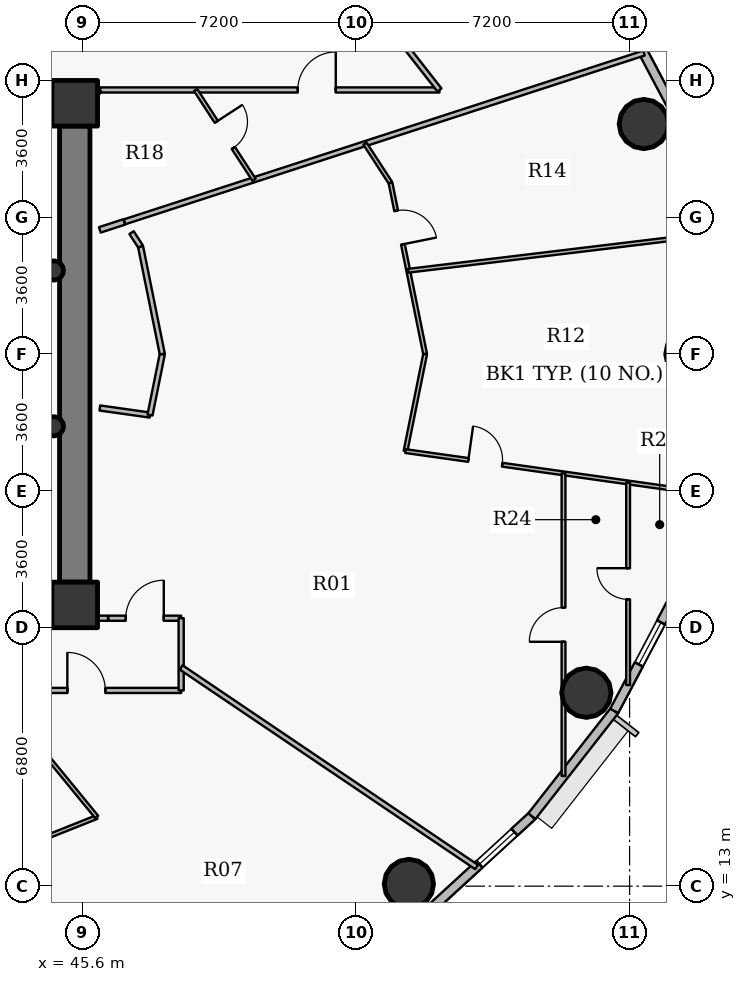
"""IFC4 building model, lengths in metres.
Left out: names, types, materials, properties, quantities, classifications, styles, units other than length and angle.
Written with IfcOpenShell. Run it as: python <this file> out.ifc"""

import sys

from ifc_helpers import new_model, si_unit, direction, frame, frame_2d, origin, origin_2d, place, context, subcontext, project, spatial, rectangle, hollow_circle, extrude, source, transform, mapped, element, fill, save


model = new_model("IFC4")
c1 = context("Model", 3, precision=1e-05, world=origin(), true_north=direction((0.0, 1.0)))
c2 = subcontext(c1, "Body", "Model", "MODEL_VIEW")
j1 = project(units=[si_unit("LENGTHUNIT", "METRE"), si_unit("PLANEANGLEUNIT", "RADIAN")], contexts=[c1])
p1 = place(None, origin())
s1 = spatial("IfcSite", under=j1, at=p1, CompositionType="ELEMENT")
p2 = place(p1, origin())
s2 = spatial("IfcBuilding", under=s1, at=p2, CompositionType="ELEMENT")
p3 = place(p2, frame((0.0, 0.0, 159.9)))
s3 = spatial("IfcBuildingStorey", under=s2, at=p3, CompositionType="ELEMENT", Elevation=159.9)
for number, where, z_axis, x_axis in (
    (1, (45.4, 20.4, 0.0), (0.0, 0.0, 1.0), (1.0, 0.0, 0.0)),
    (2, (45.4, 33.6, 0.0), (0.0, 0.0, 1.0), (1.0, 0.0, 0.0)),
):
    element("IfcColumn", number, at=place(p3, frame(where, z_axis=z_axis, x_axis=x_axis)), inside=s3, PredefinedType="COLUMN", context=c2, shape_type="SweptSolid", body=[
        extrude(rectangle(XDim=1.2, YDim=1.2, at=origin_2d()), origin(), (0.0, 0.0, 1.0), 3.75),
    ])
p4 = place(p3, frame((45.4, 33.0, 0.0), z_axis=(0.0, 0.0, 1.0), x_axis=(0.0, -1.0, 0.0)))
e3 = element("IfcWall", 3, at=p4, inside=s3, PredefinedType="SHEAR", context=c2, shape_type="SweptSolid", body=[
    extrude(rectangle(XDim=12.0, YDim=0.8, at=frame_2d((6.0, 0.0))), origin(), (0.0, 0.0, 1.0), 2.95),
])
for number, where, z_axis, x_axis in (
    (4, (61.6, 27.0, 0.0), (0.0, 0.0, 1.0), (1.0, 0.0, 0.0)),
    (5, (60.375, 33.053, 0.0), (0.0, 0.0, 1.0), (1.0, 0.0, 0.0)),
    (6, (54.192, 13.058, 0.0), (0.0, 0.0, 1.0), (1.0, 0.0, 0.0)),
    (7, (58.863, 18.089, 0.0), (0.0, 0.0, 1.0), (1.0, 0.0, 0.0)),
):
    element("IfcColumn", number, at=place(p3, frame(where, z_axis=z_axis, x_axis=x_axis)), inside=s3, PredefinedType="COLUMN", context=c2, shape_type="SweptSolid", body=[
        extrude(hollow_circle(Radius=0.65, WallThickness=0.04, at=origin_2d()), origin(), (0.0, 0.0, 1.0), 3.75),
    ])
for number, where, z_axis, x_axis in (
    (8, (44.85, 25.1, 0.0), (0.0, 0.0, 1.0), (1.0, 0.0, 0.0)),
    (9, (44.85, 29.2, 0.0), (0.0, 0.0, 1.0), (1.0, 0.0, 0.0)),
):
    element("IfcColumn", number, at=place(p3, frame(where, z_axis=z_axis, x_axis=x_axis)), inside=s3, PredefinedType="COLUMN", context=c2, shape_type="SweptSolid", body=[
        extrude(hollow_circle(Radius=0.254, WallThickness=0.02, at=origin_2d()), origin(), (0.0, 0.0, 1.0), 3.75),
    ])
p5 = place(p3, frame((59.596, 36.388, 0.0), z_axis=(0.0, 0.0, 1.0), x_axis=(0.467586874938, -0.88394712194, 0.0)))
e10 = element("IfcWall", 10, at=p5, inside=s3, PredefinedType="SOLIDWALL", context=c2, shape_type="SweptSolid", body=[
    extrude(rectangle(XDim=3.393, YDim=0.24, at=frame_2d((1.697, 0.0))), origin(), (0.0, 0.0, 1.0), 3.5),
])
p6 = place(p3, frame((57.428, 14.842, 0.0), z_axis=(0.0, 0.0, 1.0), x_axis=(-0.737076565834, -0.675809245349, 0.0)))
e11 = element("IfcWall", 11, at=p6, inside=s3, PredefinedType="SOLIDWALL", context=c2, shape_type="SweptSolid", body=[
    extrude(rectangle(XDim=3.658, YDim=0.24, at=frame_2d((1.829, 0.0))), origin(), (0.0, 0.0, 1.0), 3.5),
])
p7 = place(p6, frame((0.621, 0.0, 0.9)))
e12 = element("IfcOpeningElement", 12, at=p7, cuts=e11, PredefinedType="OPENING", context=c2, shape_type="SweptSolid", body=[
    extrude(rectangle(XDim=1.25, YDim=1.65, at=origin_2d()), frame((0.625, 0.13, 0.825), z_axis=(0.0, -1.0, 0.0), x_axis=(1.0, 0.0, 0.0)), (0.0, 0.0, 1.0), 0.26),
])
p8 = place(p3, frame((59.596, 17.612, 0.0), z_axis=(0.0, 0.0, 1.0), x_axis=(-0.616287674549, -0.787521112224, 0.0)))
e13 = element("IfcWall", 13, at=p8, inside=s3, PredefinedType="SOLIDWALL", context=c2, shape_type="SweptSolid", body=[
    extrude(rectangle(XDim=3.517, YDim=0.24, at=frame_2d((1.759, 0.0))), origin(), (0.0, 0.0, 1.0), 3.5),
])
p9 = place(p3, frame((61.183, 20.611, 0.0), z_axis=(0.0, 0.0, 1.0), x_axis=(-0.467586874938, -0.88394712194, 0.0)))
e14 = element("IfcWall", 14, at=p9, inside=s3, PredefinedType="SOLIDWALL", context=c2, shape_type="SweptSolid", body=[
    extrude(rectangle(XDim=3.393, YDim=0.24, at=frame_2d((1.697, 0.0))), origin(), (0.0, 0.0, 1.0), 3.5),
])
p10 = place(p9, frame((0.759, 0.0, 0.9)))
e15 = element("IfcOpeningElement", 15, at=p10, cuts=e14, PredefinedType="OPENING", context=c2, shape_type="SweptSolid", body=[
    extrude(rectangle(XDim=1.25, YDim=1.65, at=origin_2d()), frame((0.625, 0.13, 0.825), z_axis=(0.0, -1.0, 0.0), x_axis=(1.0, 0.0, 0.0)), (0.0, 0.0, 1.0), 0.26),
])
p11 = place(p3, frame((35.486, 18.15, 0.0), z_axis=(0.0, 0.0, 1.0), x_axis=(1.0, 0.0, 0.0)))
e16 = element("IfcWall", 16, at=p11, inside=s3, PredefinedType="PARTITIONING", context=c2, shape_type="SweptSolid", body=[
    extrude(rectangle(XDim=12.714, YDim=0.135, at=frame_2d((6.357, 0.0))), origin(), (0.0, 0.0, 1.0), 2.935),
])
p12 = place(p11, frame((1.628, 0.0, 0.0)))
e17 = element("IfcOpeningElement", 17, at=p12, cuts=e16, PredefinedType="OPENING", context=c2, shape_type="SweptSolid", body=[
    extrude(rectangle(XDim=1.0, YDim=2.15, at=origin_2d()), frame((0.5, 0.078, 1.075), z_axis=(0.0, -1.0, 0.0), x_axis=(1.0, 0.0, 0.0)), (0.0, 0.0, 1.0), 0.155),
])
p13 = place(p11, frame((9.719, 0.0, 0.0)))
e18 = element("IfcOpeningElement", 18, at=p13, cuts=e16, PredefinedType="OPENING", context=c2, shape_type="SweptSolid", body=[
    extrude(rectangle(XDim=1.0, YDim=2.15, at=origin_2d()), frame((0.5, 0.078, 1.075), z_axis=(0.0, -1.0, 0.0), x_axis=(1.0, 0.0, 0.0)), (0.0, 0.0, 1.0), 0.155),
])
p14 = place(p3, frame((41.794, 13.149, 0.0), z_axis=(0.0, 0.0, 1.0), x_axis=(0.928797683311, 0.370587187415, 0.0)))
e19 = element("IfcWall", 19, at=p14, inside=s3, PredefinedType="PARTITIONING", context=c2, shape_type="SweptSolid", body=[
    extrude(rectangle(XDim=4.506, YDim=0.1, at=frame_2d((2.253, 0.0))), origin(), (0.0, 0.0, 1.0), 2.935),
])
p15 = place(p14, frame((1.803, 0.0, 0.0)))
e20 = element("IfcOpeningElement", 20, at=p15, cuts=e19, PredefinedType="OPENING", context=c2, shape_type="SweptSolid", body=[
    extrude(rectangle(XDim=0.9, YDim=2.1, at=origin_2d()), frame((0.45, 0.06, 1.05), z_axis=(0.0, -1.0, 0.0), x_axis=(1.0, 0.0, 0.0)), (0.0, 0.0, 1.0), 0.12),
])
p16 = place(p3, frame((43.25, 18.15, 0.0), z_axis=(0.0, 0.0, 1.0), x_axis=(0.633743940899, -0.773542899505, 0.0)))
e21 = element("IfcWall", 21, at=p16, inside=s3, PredefinedType="PARTITIONING", context=c2, shape_type="SweptSolid", body=[
    extrude(rectangle(XDim=4.307, YDim=0.1, at=frame_2d((2.153, 0.0))), origin(), (0.0, 0.0, 1.0), 3.5),
])
p17 = place(p16, frame((0.414, 0.0, 0.0)))
e22 = element("IfcOpeningElement", 22, at=p17, cuts=e21, PredefinedType="OPENING", context=c2, shape_type="SweptSolid", body=[
    extrude(rectangle(XDim=0.82, YDim=2.1, at=origin_2d()), frame((0.41, 0.06, 1.05), z_axis=(0.0, -1.0, 0.0), x_axis=(1.0, 0.0, 0.0)), (0.0, 0.0, 1.0), 0.12),
])
p18 = place(p3, frame((46.065, 33.95, 0.0), z_axis=(0.0, 0.0, 1.0), x_axis=(1.0, 0.0, 0.0)))
e23 = element("IfcWall", 23, at=p18, inside=s3, PredefinedType="PARTITIONING", context=c2, shape_type="SweptSolid", body=[
    extrude(rectangle(XDim=8.932, YDim=0.135, at=frame_2d((4.466, 0.0))), origin(), (0.0, 0.0, 1.0), 3.5),
])
p19 = place(p18, frame((5.204, 0.0, 0.0)))
e24 = element("IfcOpeningElement", 24, at=p19, cuts=e23, PredefinedType="OPENING", context=c2, shape_type="SweptSolid", body=[
    extrude(rectangle(XDim=1.0, YDim=2.15, at=origin_2d()), frame((0.5, 0.078, 1.075), z_axis=(0.0, -1.0, 0.0), x_axis=(1.0, 0.0, 0.0)), (0.0, 0.0, 1.0), 0.155),
])
p20 = place(p3, frame((46.285, 20.05, 0.0), z_axis=(0.0, 0.0, 1.0), x_axis=(1.0, 0.0, 0.0)))
e25 = element("IfcWall", 25, at=p20, inside=s3, PredefinedType="PARTITIONING", context=c2, shape_type="SweptSolid", body=[
    extrude(rectangle(XDim=1.915, YDim=0.135, at=frame_2d((0.958, 0.0))), origin(), (0.0, 0.0, 1.0), 3.5),
])
p21 = place(p20, frame((0.458, 0.0, 0.0)))
e26 = element("IfcOpeningElement", 26, at=p21, cuts=e25, PredefinedType="OPENING", context=c2, shape_type="SweptSolid", body=[
    extrude(rectangle(XDim=1.0, YDim=2.15, at=origin_2d()), frame((0.5, 0.078, 1.075), z_axis=(0.0, -1.0, 0.0), x_axis=(1.0, 0.0, 0.0)), (0.0, 0.0, 1.0), 0.155),
])
p22 = place(p3, frame((46.71, 30.48, 0.0), z_axis=(0.0, 0.0, 1.0), x_axis=(0.951054665008, 0.309022691992, 0.0)))
e27 = element("IfcWall", 27, at=p22, inside=s3, PredefinedType="PARTITIONING", context=c2, shape_type="SweptSolid", body=[
    extrude(rectangle(XDim=14.372, YDim=0.135, at=frame_2d((7.186, 0.0))), origin(), (0.0, 0.0, 1.0), 2.935),
])
p23 = place(p3, frame((48.2, 18.15, 0.0), z_axis=(0.0, 0.0, 1.0), x_axis=(0.0, 1.0, 0.0)))
e28 = element("IfcWall", 28, at=p23, inside=s3, PredefinedType="PARTITIONING", context=c2, shape_type="SweptSolid", body=[
    extrude(rectangle(XDim=1.9, YDim=0.135, at=frame_2d((0.95, 0.0))), origin(), (0.0, 0.0, 1.0), 3.5),
])
p24 = place(p3, frame((48.2, 18.756, 0.0), z_axis=(0.0, 0.0, 1.0), x_axis=(0.828559609568, -0.559900860325, 0.0)))
e29 = element("IfcWall", 29, at=p24, inside=s3, PredefinedType="PARTITIONING", context=c2, shape_type="SweptSolid", body=[
    extrude(rectangle(XDim=9.384, YDim=0.135, at=frame_2d((4.692, 0.0))), origin(), (0.0, 0.0, 1.0), 2.935),
])
p25 = place(p3, frame((48.58, 33.95, 0.0), z_axis=(0.0, 0.0, 1.0), x_axis=(0.545393120499, -0.838180376836, 0.0)))
e30 = element("IfcWall", 30, at=p25, inside=s3, PredefinedType="PARTITIONING", context=c2, shape_type="SweptSolid", body=[
    extrude(rectangle(XDim=2.819, YDim=0.1, at=frame_2d((1.41, 0.0))), origin(), (0.0, 0.0, 1.0), 3.5),
])
p26 = place(p25, frame((1.0, 0.0, 0.0)))
e31 = element("IfcOpeningElement", 31, at=p26, cuts=e30, PredefinedType="OPENING", context=c2, shape_type="SweptSolid", body=[
    extrude(rectangle(XDim=0.82, YDim=2.1, at=origin_2d()), frame((0.41, 0.06, 1.05), z_axis=(0.0, -1.0, 0.0), x_axis=(1.0, 0.0, 0.0)), (0.0, 0.0, 1.0), 0.12),
])
p27 = place(p3, frame((53.038, 32.536, 0.0), z_axis=(0.0, 0.0, 1.0), x_axis=(0.545407162254, -0.83817123988, 0.0)))
e32 = element("IfcWall", 32, at=p27, inside=s3, PredefinedType="PARTITIONING", context=c2, shape_type="SweptSolid", body=[
    extrude(rectangle(XDim=1.229, YDim=0.1, at=frame_2d((0.615, 0.0))), origin(), (0.0, 0.0, 1.0), 2.935),
])
p28 = place(p3, frame((53.653, 35.667, 0.0), z_axis=(0.0, 0.0, 1.0), x_axis=(0.616302223209, -0.787509726713, 0.0)))
e33 = element("IfcWall", 33, at=p28, inside=s3, PredefinedType="PARTITIONING", context=c2, shape_type="SweptSolid", body=[
    extrude(rectangle(XDim=2.18, YDim=0.135, at=frame_2d((1.09, 0.0))), origin(), (0.0, 0.0, 1.0), 3.5),
])
p29 = place(p3, frame((53.709, 31.506, 0.0), z_axis=(0.0, 0.0, 1.0), x_axis=(0.198209478932, -0.980159682124, 0.0)))
e34 = element("IfcWall", 34, at=p29, inside=s3, PredefinedType="PARTITIONING", context=c2, shape_type="SweptSolid", body=[
    extrude(rectangle(XDim=4.597, YDim=0.1, at=frame_2d((2.298, 0.0))), origin(), (0.0, 0.0, 1.0), 2.935),
])
p30 = place(p29, frame((0.75, 0.0, 0.0)))
e35 = element("IfcOpeningElement", 35, at=p30, cuts=e34, PredefinedType="OPENING", context=c2, shape_type="SweptSolid", body=[
    extrude(rectangle(XDim=0.9, YDim=2.1, at=origin_2d()), frame((0.45, 0.06, 1.05), z_axis=(0.0, -1.0, 0.0), x_axis=(1.0, 0.0, 0.0)), (0.0, 0.0, 1.0), 0.12),
])
p31 = place(p3, frame((54.104, 24.448, 0.0), z_axis=(0.0, 0.0, 1.0), x_axis=(0.198315541218, 0.980138228063, 0.0)))
e36 = element("IfcWall", 36, at=p31, inside=s3, PredefinedType="PARTITIONING", context=c2, shape_type="SweptSolid", body=[
    extrude(rectangle(XDim=2.604, YDim=0.1, at=frame_2d((1.302, 0.0))), origin(), (0.0, 0.0, 1.0), 2.935),
])
p32 = place(p3, frame((54.104, 24.448, 0.0), z_axis=(0.0, 0.0, 1.0), x_axis=(0.990209750791, -0.139587425789, 0.0)))
e37 = element("IfcWall", 37, at=p32, inside=s3, PredefinedType="PARTITIONING", context=c2, shape_type="SweptSolid", body=[
    extrude(rectangle(XDim=7.997, YDim=0.1, at=frame_2d((3.998, 0.0))), origin(), (0.0, 0.0, 1.0), 2.935),
])
p33 = place(p32, frame((1.67, 0.0, 0.0)))
e38 = element("IfcOpeningElement", 38, at=p33, cuts=e37, PredefinedType="OPENING", context=c2, shape_type="SweptSolid", body=[
    extrude(rectangle(XDim=0.9, YDim=2.1, at=origin_2d()), frame((0.45, 0.06, 1.05), z_axis=(0.0, -1.0, 0.0), x_axis=(1.0, 0.0, 0.0)), (0.0, 0.0, 1.0), 0.12),
])
p34 = place(p3, frame((54.177, 29.193, 0.0), z_axis=(0.0, 0.0, 1.0), x_axis=(0.992799222866, 0.119790246168, 0.0)))
e39 = element("IfcWall", 39, at=p34, inside=s3, PredefinedType="PARTITIONING", context=c2, shape_type="SweptSolid", body=[
    extrude(rectangle(XDim=8.044, YDim=0.1, at=frame_2d((4.022, 0.0))), origin(), (0.0, 0.0, 1.0), 2.935),
])
p35 = place(p3, frame((58.262, 15.899, 0.0), z_axis=(0.0, 0.0, 1.0), x_axis=(0.0, 1.0, 0.0)))
e40 = element("IfcWall", 40, at=p35, inside=s3, PredefinedType="PARTITIONING", context=c2, shape_type="SweptSolid", body=[
    extrude(rectangle(XDim=7.963, YDim=0.1, at=frame_2d((3.981, 0.0))), origin(), (0.0, 0.0, 1.0), 2.935),
])
p36 = place(p35, frame((3.531, 0.0, 0.0)))
e41 = element("IfcOpeningElement", 41, at=p36, cuts=e40, PredefinedType="OPENING", context=c2, shape_type="SweptSolid", body=[
    extrude(rectangle(XDim=0.9, YDim=2.1, at=origin_2d()), frame((0.45, 0.06, 1.05), z_axis=(0.0, -1.0, 0.0), x_axis=(1.0, 0.0, 0.0)), (0.0, 0.0, 1.0), 0.12),
])
p37 = place(p3, frame((59.961, 18.291, 0.0), z_axis=(0.0, 0.0, 1.0), x_axis=(0.0, 1.0, 0.0)))
e42 = element("IfcWall", 42, at=p37, inside=s3, PredefinedType="PARTITIONING", context=c2, shape_type="SweptSolid", body=[
    extrude(rectangle(XDim=5.331, YDim=0.1, at=frame_2d((2.666, 0.0))), origin(), (0.0, 0.0, 1.0), 2.935),
])
p38 = place(p37, frame((2.256, 0.0, 0.0)))
e43 = element("IfcOpeningElement", 43, at=p38, cuts=e42, PredefinedType="OPENING", context=c2, shape_type="SweptSolid", body=[
    extrude(rectangle(XDim=0.82, YDim=2.1, at=origin_2d()), frame((0.41, 0.06, 1.05), z_axis=(0.0, -1.0, 0.0), x_axis=(1.0, 0.0, 0.0)), (0.0, 0.0, 1.0), 0.12),
])
for number, where, z_axis, x_axis in (
    (44, (45.8, 34.0, 0.0), (0.0, 0.0, 1.0), (-1.0, 0.0, 0.0)),
    (45, (44.81, 20.0, 0.0), (0.0, 0.0, 1.0), (1.0, 0.0, 0.0)),
):
    element("IfcWall", number, at=place(p3, frame(where, z_axis=z_axis, x_axis=x_axis)), inside=s3, PredefinedType="PARTITIONING", context=c2, shape_type="SweptSolid", body=[
        extrude(rectangle(XDim=0.99, YDim=0.135, at=frame_2d((0.495, 0.0))), origin(), (0.0, 0.0, 1.0), 2.935),
    ])
p39 = place(p3, frame((45.81, 20.05, 0.0), z_axis=(0.0, 0.0, 1.0), x_axis=(1.0, 0.0, 0.0)))
e46 = element("IfcWall", 46, at=p39, inside=s3, PredefinedType="PARTITIONING", context=c2, shape_type="SweptSolid", body=[
    extrude(rectangle(XDim=0.465, YDim=0.135, at=frame_2d((0.232, 0.0))), origin(), (0.0, 0.0, 1.0), 3.5),
])
p40 = place(p3, frame((45.8, 33.01, 0.0), z_axis=(0.0, 0.0, 1.0), x_axis=(0.0, 1.0, 0.0)))
e47 = element("IfcWall", 47, at=p40, inside=s3, PredefinedType="PARTITIONING", context=c2, shape_type="SweptSolid", body=[
    extrude(rectangle(XDim=0.682, YDim=0.15, at=frame_2d((0.341, 0.0))), origin(), (0.0, 0.0, 1.0), 3.5),
])
p41 = place(p3, frame((45.8, 33.767, 0.0), z_axis=(0.0, 0.0, 1.0), x_axis=(0.823065918238, 0.56794585502, 0.0)))
e48 = element("IfcWall", 48, at=p41, inside=s3, PredefinedType="PARTITIONING", context=c2, shape_type="SweptSolid", body=[
    extrude(rectangle(XDim=0.322, YDim=0.15, at=frame_2d((0.161, 0.0))), origin(), (0.0, 0.0, 1.0), 3.5),
])
p42 = place(p3, frame((46.7, 30.477, 0.0), z_axis=(0.0, 0.0, 1.0), x_axis=(-0.951050060735, -0.309036861841, 0.0)))
e49 = element("IfcWall", 49, at=p42, inside=s3, PredefinedType="PARTITIONING", context=c2, shape_type="SweptSolid", body=[
    extrude(rectangle(XDim=0.673, YDim=0.15, at=frame_2d((0.336, 0.0))), origin(), (0.0, 0.0, 1.0), 3.5),
])
p43 = place(p3, frame((45.8, 20.378, 0.0), z_axis=(0.0, 0.0, 1.0), x_axis=(0.0, 1.0, 0.0)))
e50 = element("IfcWall", 50, at=p43, inside=s3, PredefinedType="PARTITIONING", context=c2, shape_type="SweptSolid", body=[
    extrude(rectangle(XDim=0.612, YDim=0.135, at=frame_2d((0.306, 0.0))), origin(), (0.0, 0.0, 1.0), 3.5),
])
p44 = place(p3, frame((46.06, 25.582, 0.0), z_axis=(0.0, 0.0, 1.0), x_axis=(0.990207965895, -0.139600086959, 0.0)))
e51 = element("IfcWall", 51, at=p44, inside=s3, PredefinedType="PARTITIONING", context=c2, shape_type="SweptSolid", body=[
    extrude(rectangle(XDim=1.333, YDim=0.135, at=frame_2d((0.666, 0.0))), origin(), (0.0, 0.0, 1.0), 3.5),
])
p45 = place(p3, frame((47.38, 25.396, 0.0), z_axis=(0.0, 0.0, 1.0), x_axis=(0.19826737525, 0.980147972457, 0.0)))
e52 = element("IfcWall", 52, at=p45, inside=s3, PredefinedType="PARTITIONING", context=c2, shape_type="SweptSolid", body=[
    extrude(rectangle(XDim=1.636, YDim=0.135, at=frame_2d((0.818, 0.0))), origin(), (0.0, 0.0, 1.0), 2.935),
])
p46 = place(p3, frame((47.704, 27.0, 0.0), z_axis=(0.0, 0.0, 1.0), x_axis=(-0.198292837027, 0.980142821625, 0.0)))
e53 = element("IfcWall", 53, at=p46, inside=s3, PredefinedType="PARTITIONING", context=c2, shape_type="SweptSolid", body=[
    extrude(rectangle(XDim=2.89, YDim=0.135, at=frame_2d((1.445, 0.0))), origin(), (0.0, 0.0, 1.0), 2.935),
])
p47 = place(p3, frame((47.131, 29.832, 0.0), z_axis=(0.0, 0.0, 1.0), x_axis=(-0.545305123916, 0.838237628499, 0.0)))
e54 = element("IfcWall", 54, at=p47, inside=s3, PredefinedType="PARTITIONING", context=c2, shape_type="SweptSolid", body=[
    extrude(rectangle(XDim=0.433, YDim=0.135, at=frame_2d((0.217, 0.0))), origin(), (0.0, 0.0, 1.0), 2.935),
])
m1 = source(origin(), c2, "Body", "SweptSolid", [
    extrude(rectangle(XDim=1.25, YDim=1.65, at=origin_2d()), frame((0.625, 0.03, 0.825), z_axis=(0.0, -1.0, 0.0), x_axis=(1.0, 0.0, 0.0)), (0.0, 0.0, 1.0), 0.06),
])
p48 = place(p10, origin())
e55 = element("IfcWindow", 55, at=p48, inside=s3, PartitioningType="SINGLE_PANEL", PredefinedType="WINDOW", context=c2, shape_type="MappedRepresentation", body=[
    mapped(m1, transform((0.0, 0.0, 0.0), x_axis=(1.0, 0.0, 0.0), y_axis=(0.0, 1.0, 0.0), z_axis=(0.0, 0.0, 1.0), scale=1.0)),
])
fill(e15, e55)
p49 = place(p7, origin())
e56 = element("IfcWindow", 56, at=p49, inside=s3, PartitioningType="SINGLE_PANEL", PredefinedType="WINDOW", context=c2, shape_type="MappedRepresentation", body=[
    mapped(m1, transform((0.0, 0.0, 0.0), x_axis=(1.0, 0.0, 0.0), y_axis=(0.0, 1.0, 0.0), z_axis=(0.0, 0.0, 1.0), scale=1.0)),
])
fill(e12, e56)
m2 = source(origin(), c2, "Body", "SweptSolid", [
    extrude(rectangle(XDim=1.0, YDim=2.15, at=origin_2d()), frame((0.5, 0.025, 1.075), z_axis=(0.0, -1.0, 0.0), x_axis=(1.0, 0.0, 0.0)), (0.0, 0.0, 1.0), 0.05),
])
p50 = place(p19, origin())
e57 = element("IfcDoor", 57, at=p50, inside=s3, OperationType="SINGLE_SWING_RIGHT", PredefinedType="DOOR", context=c2, shape_type="MappedRepresentation", body=[
    mapped(m2, transform((0.0, 0.0, 0.0), x_axis=(1.0, 0.0, 0.0), y_axis=(0.0, 1.0, 0.0), z_axis=(0.0, 0.0, 1.0), scale=1.0)),
])
fill(e24, e57)
m3 = source(origin(), c2, "Body", "SweptSolid", [
    extrude(rectangle(XDim=0.82, YDim=2.1, at=origin_2d()), frame((0.41, 0.025, 1.05), z_axis=(0.0, -1.0, 0.0), x_axis=(1.0, 0.0, 0.0)), (0.0, 0.0, 1.0), 0.05),
])
p51 = place(p26, origin())
e58 = element("IfcDoor", 58, at=p51, inside=s3, OperationType="SINGLE_SWING_LEFT", PredefinedType="DOOR", context=c2, shape_type="MappedRepresentation", body=[
    mapped(m3, transform((0.0, 0.0, 0.0), x_axis=(1.0, 0.0, 0.0), y_axis=(0.0, 1.0, 0.0), z_axis=(0.0, 0.0, 1.0), scale=1.0)),
])
fill(e31, e58)
p52 = place(p13, origin())
e59 = element("IfcDoor", 59, at=p52, inside=s3, OperationType="SINGLE_SWING_LEFT", PredefinedType="DOOR", context=c2, shape_type="MappedRepresentation", body=[
    mapped(m2, transform((0.0, 0.0, 0.0), x_axis=(1.0, 0.0, 0.0), y_axis=(0.0, 1.0, 0.0), z_axis=(0.0, 0.0, 1.0), scale=1.0)),
])
fill(e18, e59)
p53 = place(p21, origin())
e60 = element("IfcDoor", 60, at=p53, inside=s3, OperationType="SINGLE_SWING_RIGHT", PredefinedType="DOOR", context=c2, shape_type="MappedRepresentation", body=[
    mapped(m2, transform((0.0, 0.0, 0.0), x_axis=(1.0, 0.0, 0.0), y_axis=(0.0, 1.0, 0.0), z_axis=(0.0, 0.0, 1.0), scale=1.0)),
])
fill(e26, e60)
m4 = source(origin(), c2, "Body", "SweptSolid", [
    extrude(rectangle(XDim=0.9, YDim=2.1, at=origin_2d()), frame((0.45, 0.025, 1.05), z_axis=(0.0, -1.0, 0.0), x_axis=(1.0, 0.0, 0.0)), (0.0, 0.0, 1.0), 0.05),
])
p54 = place(p33, origin())
e61 = element("IfcDoor", 61, at=p54, inside=s3, OperationType="SINGLE_SWING_LEFT", PredefinedType="DOOR", context=c2, shape_type="MappedRepresentation", body=[
    mapped(m4, transform((0.0, 0.0, 0.0), x_axis=(1.0, 0.0, 0.0), y_axis=(0.0, 1.0, 0.0), z_axis=(0.0, 0.0, 1.0), scale=1.0)),
])
fill(e38, e61)
p55 = place(p30, origin())
e62 = element("IfcDoor", 62, at=p55, inside=s3, OperationType="SINGLE_SWING_RIGHT", PredefinedType="DOOR", context=c2, shape_type="MappedRepresentation", body=[
    mapped(m4, transform((0.0, 0.0, 0.0), x_axis=(1.0, 0.0, 0.0), y_axis=(0.0, 1.0, 0.0), z_axis=(0.0, 0.0, 1.0), scale=1.0)),
])
fill(e35, e62)
p56 = place(p36, origin())
e63 = element("IfcDoor", 63, at=p56, inside=s3, OperationType="SINGLE_SWING_LEFT", PredefinedType="DOOR", context=c2, shape_type="MappedRepresentation", body=[
    mapped(m4, transform((0.0, 0.0, 0.0), x_axis=(1.0, 0.0, 0.0), y_axis=(0.0, 1.0, 0.0), z_axis=(0.0, 0.0, 1.0), scale=1.0)),
])
fill(e41, e63)
p57 = place(p38, origin())
e64 = element("IfcDoor", 64, at=p57, inside=s3, OperationType="SINGLE_SWING_RIGHT", PredefinedType="DOOR", context=c2, shape_type="MappedRepresentation", body=[
    mapped(m3, transform((0.0, 0.0, 0.0), x_axis=(1.0, 0.0, 0.0), y_axis=(0.0, 1.0, 0.0), z_axis=(0.0, 0.0, 1.0), scale=1.0)),
])
fill(e43, e64)
save(model, sys.argv[1])
